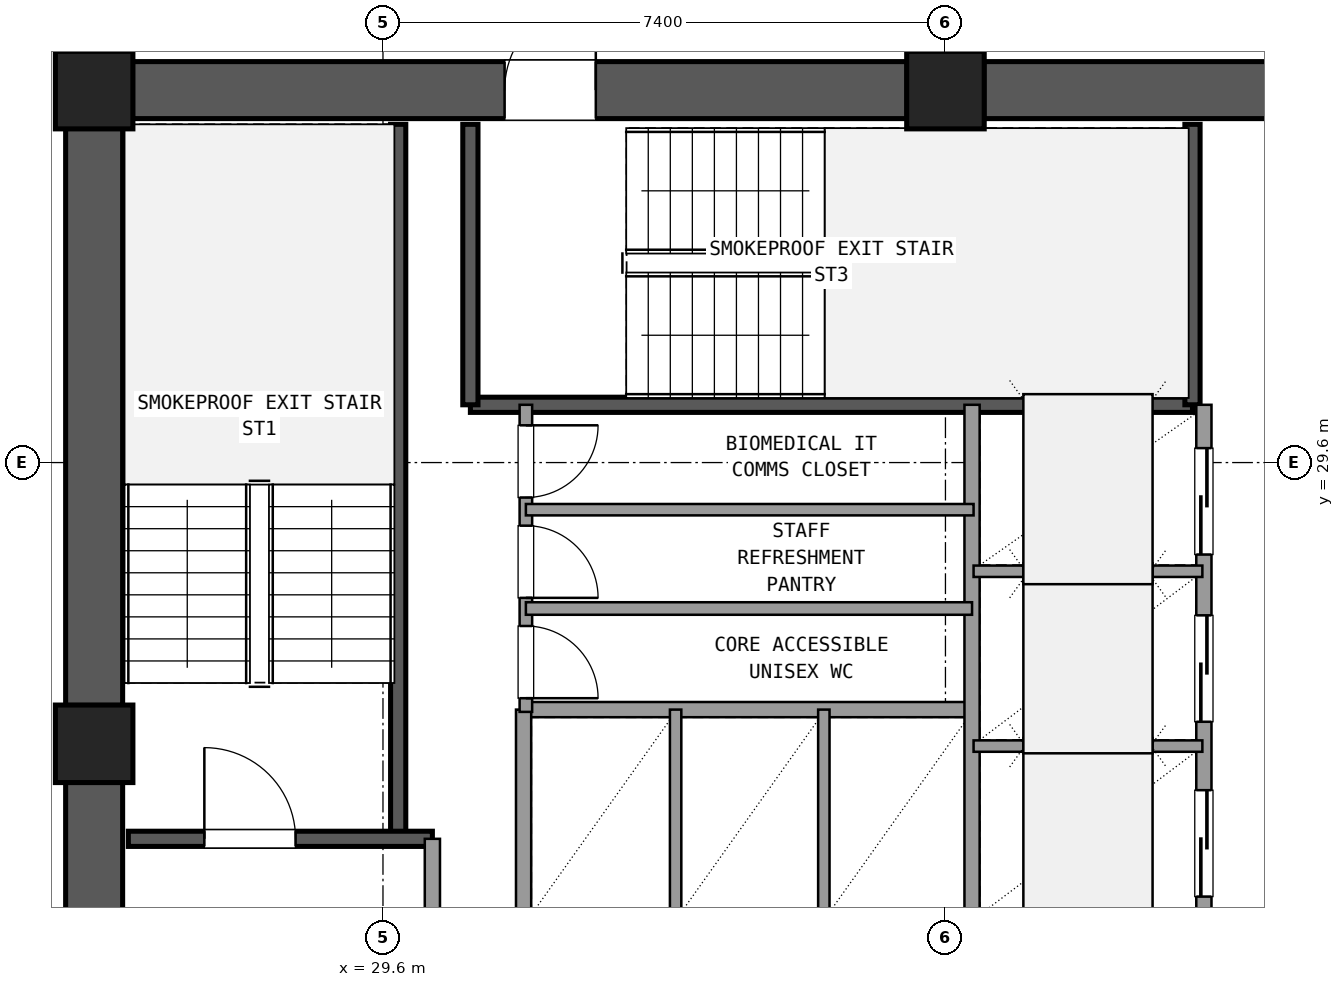
"""IFC4 building model, lengths in metres.
Left out: names, types, materials, properties, quantities, classifications, styles, units other than length and angle.
Written with IfcOpenShell. Run it as: python <this file> out.ifc"""

import sys

from ifc_helpers import new_model, si_unit, direction, frame, frame_2d, origin, origin_2d, place, context, subcontext, project, spatial, rectangle, extrude, element, fill, save


model = new_model("IFC4")
c1 = context("Model", 3, precision=1e-05, world=origin(), true_north=direction((0.0, 1.0)))
c2 = subcontext(c1, "Body", "Model", "MODEL_VIEW")
j1 = project(units=[si_unit("LENGTHUNIT", "METRE"), si_unit("PLANEANGLEUNIT", "RADIAN")], contexts=[c1])
p1 = place(None, origin())
s1 = spatial("IfcSite", under=j1, at=p1, CompositionType="ELEMENT")
p2 = place(p1, origin())
s2 = spatial("IfcBuilding", under=s1, at=p2, CompositionType="ELEMENT")
p3 = place(p2, frame((0.0, 0.0, 142.02)))
s3 = spatial("IfcBuildingStorey", under=s2, at=p3, CompositionType="ELEMENT", Elevation=142.02)
for number, where, z_axis, x_axis in (
    (1, (37.0, 34.5, 0.0), (0.0, 0.0, 1.0), (1.0, 0.0, 0.0)),
    (2, (25.8, 34.5, 0.0), (0.0, 0.0, 1.0), (1.0, 0.0, 0.0)),
    (3, (25.8, 25.9, 0.0), (0.0, 0.0, 1.0), (1.0, 0.0, 0.0)),
):
    element("IfcColumn", number, at=place(p3, frame(where, z_axis=z_axis, x_axis=x_axis)), inside=s3, PredefinedType="COLUMN", context=c2, shape_type="SweptSolid", body=[
        extrude(rectangle(XDim=1.02, YDim=1.02, at=origin_2d()), origin(), (0.0, 0.0, 1.0), 3.6),
    ])
p4 = place(p3, frame((47.695, 34.5, 0.0), z_axis=(0.0, 0.0, 1.0), x_axis=(-1.0, 0.0, 0.0)))
e4 = element("IfcWall", 4, at=p4, inside=s3, PredefinedType="SHEAR", context=c2, shape_type="SweptSolid", body=[
    extrude(rectangle(XDim=10.19, YDim=0.75, at=frame_2d((5.095, 0.0))), origin(), (0.0, 0.0, 1.0), 3.32),
])
p5 = place(p4, frame((4.595, 0.0, 0.0)))
e5 = element("IfcOpeningElement", 5, at=p5, cuts=e4, PredefinedType="OPENING", context=c2, shape_type="SweptSolid", body=[
    extrude(rectangle(XDim=1.6, YDim=2.2, at=frame_2d((0.8, 1.1))), frame((0.0, 0.385, 0.0), z_axis=(0.0, -1.0, 0.0), x_axis=(1.0, 0.0, 0.0)), (0.0, 0.0, 1.0), 0.77),
])
p6 = place(p3, frame((36.495, 34.5, 0.0), z_axis=(0.0, 0.0, 1.0), x_axis=(-1.0, 0.0, 0.0)))
e6 = element("IfcWall", 6, at=p6, inside=s3, PredefinedType="SHEAR", context=c2, shape_type="SweptSolid", body=[
    extrude(rectangle(XDim=10.19, YDim=0.75, at=frame_2d((5.095, 0.0))), origin(), (0.0, 0.0, 1.0), 3.32),
])
p7 = place(p6, frame((4.095, 0.0, 0.0)))
e7 = element("IfcOpeningElement", 7, at=p7, cuts=e6, PredefinedType="OPENING", context=c2, shape_type="SweptSolid", body=[
    extrude(rectangle(XDim=1.2, YDim=2.15, at=frame_2d((0.6, 1.075))), frame((0.0, 0.385, 0.0), z_axis=(0.0, -1.0, 0.0), x_axis=(1.0, 0.0, 0.0)), (0.0, 0.0, 1.0), 0.77),
])
p8 = place(p3, frame((25.8, 33.995, 0.0), z_axis=(0.0, 0.0, 1.0), x_axis=(0.0, -1.0, 0.0)))
e8 = element("IfcWall", 8, at=p8, inside=s3, PredefinedType="SHEAR", context=c2, shape_type="SweptSolid", body=[
    extrude(rectangle(XDim=7.59, YDim=0.75, at=frame_2d((3.795, 0.0))), origin(), (0.0, 0.0, 1.0), 3.32),
])
p9 = place(p3, frame((25.8, 25.395, 0.0), z_axis=(0.0, 0.0, 1.0), x_axis=(0.0, -1.0, 0.0)))
e9 = element("IfcWall", 9, at=p9, inside=s3, PredefinedType="SHEAR", context=c2, shape_type="SweptSolid", body=[
    extrude(rectangle(XDim=7.59, YDim=0.75, at=frame_2d((3.795, 0.0))), origin(), (0.0, 0.0, 1.0), 3.32),
])
p10 = place(p9, frame((2.145, 0.0, 0.0)))
e10 = element("IfcOpeningElement", 10, at=p10, cuts=e9, PredefinedType="OPENING", context=c2, shape_type="SweptSolid", body=[
    extrude(rectangle(XDim=1.2, YDim=2.15, at=frame_2d((0.6, 1.075))), frame((0.0, 0.385, 0.0), z_axis=(0.0, -1.0, 0.0), x_axis=(1.0, 0.0, 0.0)), (0.0, 0.0, 1.0), 0.77),
])
p11 = place(p3, frame((29.8, 24.65, 0.0), z_axis=(0.0, 0.0, 1.0), x_axis=(0.0, 1.0, 0.0)))
e11 = element("IfcWall", 11, at=p11, inside=s3, PredefinedType="SHEAR", context=c2, shape_type="SweptSolid", body=[
    extrude(rectangle(XDim=9.4, YDim=0.2, at=frame_2d((4.7, 0.0))), origin(), (0.0, 0.0, 1.0), 3.32),
])
p12 = place(p3, frame((26.25, 24.65, 0.0), z_axis=(0.0, 0.0, 1.0), x_axis=(1.0, 0.0, 0.0)))
e12 = element("IfcWall", 12, at=p12, inside=s3, PredefinedType="SHEAR", context=c2, shape_type="SweptSolid", body=[
    extrude(rectangle(XDim=4.0, YDim=0.2, at=frame_2d((2.0, 0.0))), origin(), (0.0, 0.0, 1.0), 3.32),
])
p13 = place(p12, frame((1.0, 0.0, 0.0)))
e13 = element("IfcOpeningElement", 13, at=p13, cuts=e12, PredefinedType="OPENING", context=c2, shape_type="SweptSolid", body=[
    extrude(rectangle(XDim=1.2, YDim=2.15, at=frame_2d((0.6, 1.075))), frame((0.0, 0.11, 0.0), z_axis=(0.0, -1.0, 0.0), x_axis=(1.0, 0.0, 0.0)), (0.0, 0.0, 1.0), 0.22),
])
p14 = place(p3, frame((30.75, 30.36, 0.0), z_axis=(0.0, 0.0, 1.0), x_axis=(1.0, 0.0, 0.0)))
e14 = element("IfcWall", 14, at=p14, inside=s3, PredefinedType="SHEAR", context=c2, shape_type="SweptSolid", body=[
    extrude(rectangle(XDim=9.5, YDim=0.2, at=frame_2d((4.75, 0.0))), origin(), (0.0, 0.0, 1.0), 3.32),
])
for number, where, z_axis, x_axis in (
    (15, (30.75, 30.36, 0.0), (0.0, 0.0, 1.0), (0.0, 1.0, 0.0)),
    (16, (40.25, 30.36, 0.0), (0.0, 0.0, 1.0), (0.0, 1.0, 0.0)),
):
    element("IfcWall", number, at=place(p3, frame(where, z_axis=z_axis, x_axis=x_axis)), inside=s3, PredefinedType="SHEAR", context=c2, shape_type="SweptSolid", body=[
        extrude(rectangle(XDim=3.69, YDim=0.2, at=frame_2d((1.845, 0.0))), origin(), (0.0, 0.0, 1.0), 3.32),
    ])
p15 = place(p3, frame((30.25, 17.75, 0.0), z_axis=(0.0, 0.0, 1.0), x_axis=(0.0, 1.0, 0.0)))
e17 = element("IfcWall", 17, at=p15, inside=s3, PredefinedType="SOLIDWALL", context=c2, shape_type="SweptSolid", body=[
    extrude(rectangle(XDim=6.9, YDim=0.2, at=frame_2d((3.45, 0.0))), origin(), (0.0, 0.0, 1.0), 2.61),
])
p16 = place(p15, frame((4.15, 0.0, 0.0)))
e18 = element("IfcOpeningElement", 18, at=p16, cuts=e17, PredefinedType="OPENING", context=c2, shape_type="SweptSolid", body=[
    extrude(rectangle(XDim=1.2, YDim=2.15, at=frame_2d((0.6, 1.075))), frame((0.0, 0.11, 0.0), z_axis=(0.0, -1.0, 0.0), x_axis=(1.0, 0.0, 0.0)), (0.0, 0.0, 1.0), 0.22),
])
p17 = place(p3, frame((31.45, 26.35, 0.0), z_axis=(0.0, 0.0, 1.0), x_axis=(1.0, 0.0, 0.0)))
e19 = element("IfcWall", 19, at=p17, inside=s3, PredefinedType="SOLIDWALL", context=c2, shape_type="SweptSolid", body=[
    extrude(rectangle(XDim=5.9, YDim=0.2, at=frame_2d((2.95, 0.0))), origin(), (0.0, 0.0, 1.0), 2.61),
])
p18 = place(p3, frame((31.45, 23.54, 0.0), z_axis=(0.0, 0.0, 1.0), x_axis=(0.0, 1.0, 0.0)))
e20 = element("IfcWall", 20, at=p18, inside=s3, PredefinedType="SOLIDWALL", context=c2, shape_type="SweptSolid", body=[
    extrude(rectangle(XDim=2.81, YDim=0.2, at=frame_2d((1.405, 0.0))), origin(), (0.0, 0.0, 1.0), 2.61),
])
for number, where, z_axis, x_axis in (
    (21, (33.45, 23.54, 0.0), (0.0, 0.0, 1.0), (0.0, 1.0, 0.0)),
    (22, (35.4, 23.54, 0.0), (0.0, 0.0, 1.0), (0.0, 1.0, 0.0)),
):
    element("IfcWall", number, at=place(p3, frame(where, z_axis=z_axis, x_axis=x_axis)), inside=s3, PredefinedType="PARTITIONING", context=c2, shape_type="SweptSolid", body=[
        extrude(rectangle(XDim=2.81, YDim=0.15, at=frame_2d((1.405, 0.0))), origin(), (0.0, 0.0, 1.0), 2.61),
    ])
p19 = place(p3, frame((37.35, 23.54, 0.0), z_axis=(0.0, 0.0, 1.0), x_axis=(0.0, 1.0, 0.0)))
e23 = element("IfcWall", 23, at=p19, inside=s3, PredefinedType="SOLIDWALL", context=c2, shape_type="SweptSolid", body=[
    extrude(rectangle(XDim=6.82, YDim=0.2, at=frame_2d((3.41, 0.0))), origin(), (0.0, 0.0, 1.0), 2.61),
])
p20 = place(p3, frame((40.4, 23.54, 0.0), z_axis=(0.0, 0.0, 1.0), x_axis=(0.0, 1.0, 0.0)))
e24 = element("IfcWall", 24, at=p20, inside=s3, PredefinedType="SOLIDWALL", context=c2, shape_type="SweptSolid", body=[
    extrude(rectangle(XDim=6.82, YDim=0.2, at=frame_2d((3.41, 0.0))), origin(), (0.0, 0.0, 1.0), 2.61),
])
p21 = place(p20, frame((0.35, 0.0, 0.0)))
e25 = element("IfcOpeningElement", 25, at=p21, cuts=e24, PredefinedType="OPENING", context=c2, shape_type="SweptSolid", body=[
    extrude(rectangle(XDim=1.4, YDim=2.2, at=frame_2d((0.7, 1.1))), frame((0.0, 0.11, 0.0), z_axis=(0.0, -1.0, 0.0), x_axis=(1.0, 0.0, 0.0)), (0.0, 0.0, 1.0), 0.22),
])
p22 = place(p20, frame((2.65, 0.0, 0.0)))
e26 = element("IfcOpeningElement", 26, at=p22, cuts=e24, PredefinedType="OPENING", context=c2, shape_type="SweptSolid", body=[
    extrude(rectangle(XDim=1.4, YDim=2.2, at=frame_2d((0.7, 1.1))), frame((0.0, 0.11, 0.0), z_axis=(0.0, -1.0, 0.0), x_axis=(1.0, 0.0, 0.0)), (0.0, 0.0, 1.0), 0.22),
])
p23 = place(p20, frame((4.85, 0.0, 0.0)))
e27 = element("IfcOpeningElement", 27, at=p23, cuts=e24, PredefinedType="OPENING", context=c2, shape_type="SweptSolid", body=[
    extrude(rectangle(XDim=1.4, YDim=2.2, at=frame_2d((0.7, 1.1))), frame((0.0, 0.11, 0.0), z_axis=(0.0, -1.0, 0.0), x_axis=(1.0, 0.0, 0.0)), (0.0, 0.0, 1.0), 0.22),
])
for number, where, z_axis, x_axis in (
    (28, (37.37, 25.87, 0.0), (0.0, 0.0, 1.0), (1.0, 0.0, 0.0)),
    (29, (37.37, 28.17, 0.0), (0.0, 0.0, 1.0), (1.0, 0.0, 0.0)),
):
    element("IfcWall", number, at=place(p3, frame(where, z_axis=z_axis, x_axis=x_axis)), inside=s3, PredefinedType="PARTITIONING", context=c2, shape_type="SweptSolid", body=[
        extrude(rectangle(XDim=3.01, YDim=0.15, at=frame_2d((1.505, 0.0))), origin(), (0.0, 0.0, 1.0), 2.61),
    ])
p24 = place(p3, frame((31.48, 26.32, 0.0), z_axis=(0.0, 0.0, 1.0), x_axis=(0.0, 1.0, 0.0)))
e30 = element("IfcWall", 30, at=p24, inside=s3, PredefinedType="PLUMBINGWALL", context=c2, shape_type="SweptSolid", body=[
    extrude(rectangle(XDim=4.04, YDim=0.165, at=frame_2d((2.02, 0.0))), origin(), (0.0, 0.0, 1.0), 2.61),
])
p25 = place(p24, frame((0.18, 0.0, 0.0)))
e31 = element("IfcOpeningElement", 31, at=p25, cuts=e30, PredefinedType="OPENING", context=c2, shape_type="SweptSolid", body=[
    extrude(rectangle(XDim=0.95, YDim=2.1, at=frame_2d((0.475, 1.05))), frame((0.0, 0.093, 0.0), z_axis=(0.0, -1.0, 0.0), x_axis=(1.0, 0.0, 0.0)), (0.0, 0.0, 1.0), 0.185),
])
p26 = place(p24, frame((1.5, 0.0, 0.0)))
e32 = element("IfcOpeningElement", 32, at=p26, cuts=e30, PredefinedType="OPENING", context=c2, shape_type="SweptSolid", body=[
    extrude(rectangle(XDim=0.95, YDim=2.1, at=frame_2d((0.475, 1.05))), frame((0.0, 0.093, 0.0), z_axis=(0.0, -1.0, 0.0), x_axis=(1.0, 0.0, 0.0)), (0.0, 0.0, 1.0), 0.185),
])
p27 = place(p24, frame((2.82, 0.0, 0.0)))
e33 = element("IfcOpeningElement", 33, at=p27, cuts=e30, PredefinedType="OPENING", context=c2, shape_type="SweptSolid", body=[
    extrude(rectangle(XDim=0.95, YDim=2.1, at=frame_2d((0.475, 1.05))), frame((0.0, 0.093, 0.0), z_axis=(0.0, -1.0, 0.0), x_axis=(1.0, 0.0, 0.0)), (0.0, 0.0, 1.0), 0.185),
])
p28 = place(p3, frame((31.48, 27.68, 0.0), z_axis=(0.0, 0.0, 1.0), x_axis=(1.0, 0.0, 0.0)))
e34 = element("IfcWall", 34, at=p28, inside=s3, PredefinedType="PLUMBINGWALL", context=c2, shape_type="SweptSolid", body=[
    extrude(rectangle(XDim=5.87, YDim=0.165, at=frame_2d((2.935, 0.0))), origin(), (0.0, 0.0, 1.0), 2.61),
])
p29 = place(p3, frame((31.48, 28.98, 0.0), z_axis=(0.0, 0.0, 1.0), x_axis=(1.0, 0.0, 0.0)))
e35 = element("IfcWall", 35, at=p29, inside=s3, PredefinedType="PARTITIONING", context=c2, shape_type="SweptSolid", body=[
    extrude(rectangle(XDim=5.89, YDim=0.15, at=frame_2d((2.945, 0.0))), origin(), (0.0, 0.0, 1.0), 2.61),
])
p30 = place(p3, frame((37.0, 34.95, 0.0), z_axis=(0.0, 0.0, 1.0), x_axis=(0.0, 1.0, 0.0)))
e36 = element("IfcWall", 36, at=p30, inside=s3, PredefinedType="PARTITIONING", context=c2, shape_type="SweptSolid", body=[
    extrude(rectangle(XDim=3.21, YDim=0.18, at=frame_2d((1.605, 0.0))), origin(), (0.0, 0.0, 1.0), 2.61),
])
p31 = place(p30, frame((0.605, 0.0, 0.0)))
e37 = element("IfcOpeningElement", 37, at=p31, cuts=e36, PredefinedType="OPENING", context=c2, shape_type="SweptSolid", body=[
    extrude(rectangle(XDim=2.0, YDim=2.2, at=frame_2d((1.0, 1.1))), frame((0.0, 0.1, 0.0), z_axis=(0.0, -1.0, 0.0), x_axis=(1.0, 0.0, 0.0)), (0.0, 0.0, 1.0), 0.2),
])
p32 = place(p13, origin())
e38 = element("IfcDoor", 38, at=p32, inside=s3, OperationType="SINGLE_SWING_LEFT", PredefinedType="DOOR", context=c2, shape_type="SweptSolid", body=[
    extrude(rectangle(XDim=1.2, YDim=2.15, at=frame_2d((0.6, 1.075))), frame((0.0, 0.025, 0.0), z_axis=(0.0, -1.0, 0.0), x_axis=(1.0, 0.0, 0.0)), (0.0, 0.0, 1.0), 0.05),
])
fill(e13, e38)
p33 = place(p7, frame((1.2, 0.0, 0.0), z_axis=(0.0, 0.0, 1.0), x_axis=(-1.0, 0.0, 0.0)))
e39 = element("IfcDoor", 39, at=p33, inside=s3, OperationType="SINGLE_SWING_LEFT", PredefinedType="DOOR", context=c2, shape_type="SweptSolid", body=[
    extrude(rectangle(XDim=1.2, YDim=2.15, at=frame_2d((0.6, 1.075))), frame((0.0, 0.025, 0.0), z_axis=(0.0, -1.0, 0.0), x_axis=(1.0, 0.0, 0.0)), (0.0, 0.0, 1.0), 0.05),
])
fill(e7, e39)
p34 = place(p21, origin())
e40 = element("IfcDoor", 40, at=p34, inside=s3, OperationType="SLIDING_TO_LEFT", PredefinedType="DOOR", context=c2, shape_type="SweptSolid", body=[
    extrude(rectangle(XDim=1.4, YDim=2.2, at=frame_2d((0.7, 1.1))), frame((0.0, 0.025, 0.0), z_axis=(0.0, -1.0, 0.0), x_axis=(1.0, 0.0, 0.0)), (0.0, 0.0, 1.0), 0.05),
])
fill(e25, e40)
p35 = place(p22, origin())
e41 = element("IfcDoor", 41, at=p35, inside=s3, OperationType="SLIDING_TO_LEFT", PredefinedType="DOOR", context=c2, shape_type="SweptSolid", body=[
    extrude(rectangle(XDim=1.4, YDim=2.2, at=frame_2d((0.7, 1.1))), frame((0.0, 0.025, 0.0), z_axis=(0.0, -1.0, 0.0), x_axis=(1.0, 0.0, 0.0)), (0.0, 0.0, 1.0), 0.05),
])
fill(e26, e41)
p36 = place(p23, origin())
e42 = element("IfcDoor", 42, at=p36, inside=s3, OperationType="SLIDING_TO_RIGHT", PredefinedType="DOOR", context=c2, shape_type="SweptSolid", body=[
    extrude(rectangle(XDim=1.4, YDim=2.2, at=frame_2d((0.7, 1.1))), frame((0.0, 0.025, 0.0), z_axis=(0.0, -1.0, 0.0), x_axis=(1.0, 0.0, 0.0)), (0.0, 0.0, 1.0), 0.05),
])
fill(e27, e42)
p37 = place(p25, frame((0.95, 0.0, 0.0), z_axis=(0.0, 0.0, 1.0), x_axis=(-1.0, 0.0, 0.0)))
e43 = element("IfcDoor", 43, at=p37, inside=s3, OperationType="SINGLE_SWING_LEFT", PredefinedType="DOOR", context=c2, shape_type="SweptSolid", body=[
    extrude(rectangle(XDim=0.95, YDim=2.1, at=frame_2d((0.475, 1.05))), frame((0.0, 0.025, 0.0), z_axis=(0.0, -1.0, 0.0), x_axis=(1.0, 0.0, 0.0)), (0.0, 0.0, 1.0), 0.05),
])
fill(e31, e43)
p38 = place(p26, frame((0.95, 0.0, 0.0), z_axis=(0.0, 0.0, 1.0), x_axis=(-1.0, 0.0, 0.0)))
e44 = element("IfcDoor", 44, at=p38, inside=s3, OperationType="SINGLE_SWING_LEFT", PredefinedType="DOOR", context=c2, shape_type="SweptSolid", body=[
    extrude(rectangle(XDim=0.95, YDim=2.1, at=frame_2d((0.475, 1.05))), frame((0.0, 0.025, 0.0), z_axis=(0.0, -1.0, 0.0), x_axis=(1.0, 0.0, 0.0)), (0.0, 0.0, 1.0), 0.05),
])
fill(e32, e44)
p39 = place(p27, frame((0.95, 0.0, 0.0), z_axis=(0.0, 0.0, 1.0), x_axis=(-1.0, 0.0, 0.0)))
e45 = element("IfcDoor", 45, at=p39, inside=s3, OperationType="SINGLE_SWING_RIGHT", PredefinedType="DOOR", context=c2, shape_type="SweptSolid", body=[
    extrude(rectangle(XDim=0.95, YDim=2.1, at=frame_2d((0.475, 1.05))), frame((0.0, 0.025, 0.0), z_axis=(0.0, -1.0, 0.0), x_axis=(1.0, 0.0, 0.0)), (0.0, 0.0, 1.0), 0.05),
])
fill(e33, e45)
save(model, sys.argv[1])
